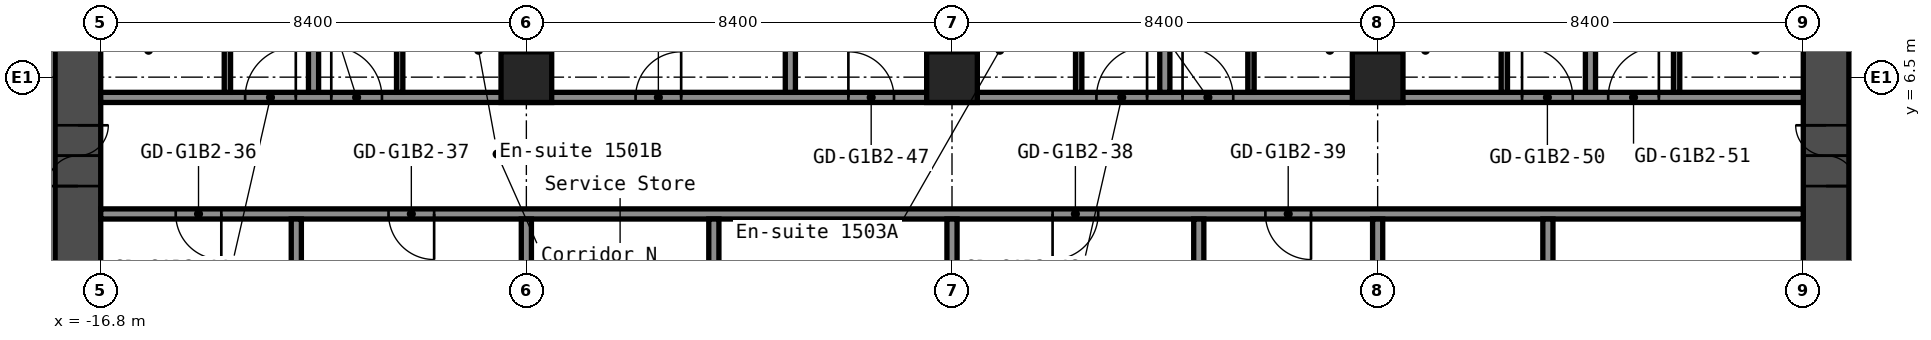
"""IFC4 building model, lengths in metres.
Left out: names, types, materials, properties, quantities, classifications, styles, units other than length and angle.
Written with IfcOpenShell. Run it as: python <this file> out.ifc"""

import sys

from ifc_helpers import new_model, si_unit, direction, frame, frame_2d, origin, origin_2d, place, context, subcontext, project, spatial, rectangle, hollow_rectangle, extrude, element, fill, save


model = new_model("IFC4")
c1 = context("Model", 3, precision=1e-05, world=origin(), true_north=direction((0.0, 1.0)))
c2 = subcontext(c1, "Body", "Model", "MODEL_VIEW")
j1 = project(units=[si_unit("LENGTHUNIT", "METRE"), si_unit("PLANEANGLEUNIT", "RADIAN")], contexts=[c1])
p1 = place(None, origin())
s1 = spatial("IfcSite", under=j1, at=p1, CompositionType="ELEMENT")
p2 = place(p1, origin())
s2 = spatial("IfcBuilding", under=s1, at=p2, CompositionType="ELEMENT")
p3 = place(p2, frame((0.0, 0.0, 55.0)))
s3 = spatial("IfcBuildingStorey", under=s2, at=p3, CompositionType="ELEMENT", Elevation=55.0)
for number, where, z_axis, x_axis in (
    (1, (-8.4, 6.5, 0.0), (0.0, 0.0, 1.0), (1.0, 0.0, 0.0)),
    (2, (0.0, 6.5, 0.0), (0.0, 0.0, 1.0), (1.0, 0.0, 0.0)),
    (3, (8.4, 6.5, 0.0), (0.0, 0.0, 1.0), (1.0, 0.0, 0.0)),
):
    element("IfcColumn", number, at=place(p3, frame(where, z_axis=z_axis, x_axis=x_axis)), inside=s3, PredefinedType="COLUMN", context=c2, shape_type="SweptSolid", body=[
        extrude(hollow_rectangle(XDim=1.0, YDim=1.0, WallThickness=0.04, at=origin_2d()), origin(), (0.0, 0.0, 1.0), 2.8),
    ])
p4 = place(p3, frame((-17.25, -8.4, 0.0), z_axis=(0.0, 0.0, 1.0), x_axis=(0.0, 1.0, 0.0)))
e4 = element("IfcWall", 4, at=p4, inside=s3, PredefinedType="SHEAR", context=c2, shape_type="SweptSolid", body=[
    extrude(rectangle(XDim=16.8, YDim=0.9, at=frame_2d((8.4, 0.0))), origin(), (0.0, 0.0, 1.0), 2.8),
])
p5 = place(p4, frame((12.75, 0.0, 0.0)))
e5 = element("IfcOpeningElement", 5, at=p5, cuts=e4, PredefinedType="OPENING", context=c2, shape_type="SweptSolid", body=[
    extrude(rectangle(XDim=1.2, YDim=2.1, at=frame_2d((0.6, 1.05))), frame((0.0, 0.46, 0.0), z_axis=(0.0, -1.0, 0.0), x_axis=(1.0, 0.0, 0.0)), (0.0, 0.0, 1.0), 0.92),
])
p6 = place(p4, frame((2.85, 0.0, 0.0)))
e6 = element("IfcOpeningElement", 6, at=p6, cuts=e4, PredefinedType="OPENING", context=c2, shape_type="SweptSolid", body=[
    extrude(rectangle(XDim=1.2, YDim=2.1, at=frame_2d((0.6, 1.05))), frame((0.0, 0.46, 0.0), z_axis=(0.0, -1.0, 0.0), x_axis=(1.0, 0.0, 0.0)), (0.0, 0.0, 1.0), 0.92),
])
p7 = place(p3, frame((17.25, -8.4, 0.0), z_axis=(0.0, 0.0, 1.0), x_axis=(0.0, 1.0, 0.0)))
e7 = element("IfcWall", 7, at=p7, inside=s3, PredefinedType="SHEAR", context=c2, shape_type="SweptSolid", body=[
    extrude(rectangle(XDim=16.8, YDim=0.9, at=frame_2d((8.4, 0.0))), origin(), (0.0, 0.0, 1.0), 2.8),
])
p8 = place(p7, frame((12.75, 0.0, 0.0)))
e8 = element("IfcOpeningElement", 8, at=p8, cuts=e7, PredefinedType="OPENING", context=c2, shape_type="SweptSolid", body=[
    extrude(rectangle(XDim=1.2, YDim=2.1, at=frame_2d((0.6, 1.05))), frame((0.0, 0.46, 0.0), z_axis=(0.0, -1.0, 0.0), x_axis=(1.0, 0.0, 0.0)), (0.0, 0.0, 1.0), 0.92),
])
p9 = place(p7, frame((2.85, 0.0, 0.0)))
e9 = element("IfcOpeningElement", 9, at=p9, cuts=e7, PredefinedType="OPENING", context=c2, shape_type="SweptSolid", body=[
    extrude(rectangle(XDim=1.2, YDim=2.1, at=frame_2d((0.6, 1.05))), frame((0.0, 0.46, 0.0), z_axis=(0.0, -1.0, 0.0), x_axis=(1.0, 0.0, 0.0)), (0.0, 0.0, 1.0), 0.92),
])
p10 = place(p3, frame((-16.8, 3.8, 0.0), z_axis=(0.0, 0.0, 1.0), x_axis=(1.0, 0.0, 0.0)))
e10 = element("IfcWall", 10, at=p10, inside=s3, PredefinedType="PARTITIONING", context=c2, shape_type="SweptSolid", body=[
    extrude(rectangle(XDim=33.6, YDim=0.2, at=frame_2d((16.8, 0.0))), origin(), (0.0, 0.0, 1.0), 2.8),
])
p11 = place(p10, frame((1.48, 0.0, 0.0)))
e11 = element("IfcOpeningElement", 11, at=p11, cuts=e10, PredefinedType="OPENING", context=c2, shape_type="SweptSolid", body=[
    extrude(rectangle(XDim=0.9, YDim=2.1, at=frame_2d((0.45, 1.05))), frame((0.0, 0.11, 0.0), z_axis=(0.0, -1.0, 0.0), x_axis=(1.0, 0.0, 0.0)), (0.0, 0.0, 1.0), 0.22),
])
p12 = place(p10, frame((5.68, 0.0, 0.0)))
e12 = element("IfcOpeningElement", 12, at=p12, cuts=e10, PredefinedType="OPENING", context=c2, shape_type="SweptSolid", body=[
    extrude(rectangle(XDim=0.9, YDim=2.1, at=frame_2d((0.45, 1.05))), frame((0.0, 0.11, 0.0), z_axis=(0.0, -1.0, 0.0), x_axis=(1.0, 0.0, 0.0)), (0.0, 0.0, 1.0), 0.22),
])
p13 = place(p10, frame((18.785, 0.0, 0.0)))
e13 = element("IfcOpeningElement", 13, at=p13, cuts=e10, PredefinedType="OPENING", context=c2, shape_type="SweptSolid", body=[
    extrude(rectangle(XDim=0.9, YDim=2.1, at=frame_2d((0.45, 1.05))), frame((0.0, 0.11, 0.0), z_axis=(0.0, -1.0, 0.0), x_axis=(1.0, 0.0, 0.0)), (0.0, 0.0, 1.0), 0.22),
])
p14 = place(p10, frame((22.985, 0.0, 0.0)))
e14 = element("IfcOpeningElement", 14, at=p14, cuts=e10, PredefinedType="OPENING", context=c2, shape_type="SweptSolid", body=[
    extrude(rectangle(XDim=0.9, YDim=2.1, at=frame_2d((0.45, 1.05))), frame((0.0, 0.11, 0.0), z_axis=(0.0, -1.0, 0.0), x_axis=(1.0, 0.0, 0.0)), (0.0, 0.0, 1.0), 0.22),
])
p15 = place(p3, frame((-16.8, 6.1, 0.0), z_axis=(0.0, 0.0, 1.0), x_axis=(1.0, 0.0, 0.0)))
e15 = element("IfcWall", 15, at=p15, inside=s3, PredefinedType="PARTITIONING", context=c2, shape_type="SweptSolid", body=[
    extrude(rectangle(XDim=33.6, YDim=0.2, at=frame_2d((16.8, 0.0))), origin(), (0.0, 0.0, 1.0), 2.8),
])
p16 = place(p15, frame((2.85, 0.0, 0.0)))
e16 = element("IfcOpeningElement", 16, at=p16, cuts=e15, PredefinedType="OPENING", context=c2, shape_type="SweptSolid", body=[
    extrude(rectangle(XDim=1.0, YDim=2.1, at=frame_2d((0.5, 1.05))), frame((0.0, 0.11, 0.0), z_axis=(0.0, -1.0, 0.0), x_axis=(1.0, 0.0, 0.0)), (0.0, 0.0, 1.0), 0.22),
])
p17 = place(p15, frame((4.55, 0.0, 0.0)))
e17 = element("IfcOpeningElement", 17, at=p17, cuts=e15, PredefinedType="OPENING", context=c2, shape_type="SweptSolid", body=[
    extrude(rectangle(XDim=1.0, YDim=2.1, at=frame_2d((0.5, 1.05))), frame((0.0, 0.11, 0.0), z_axis=(0.0, -1.0, 0.0), x_axis=(1.0, 0.0, 0.0)), (0.0, 0.0, 1.0), 0.22),
])
p18 = place(p15, frame((10.555, 0.0, 0.0)))
e18 = element("IfcOpeningElement", 18, at=p18, cuts=e15, PredefinedType="OPENING", context=c2, shape_type="SweptSolid", body=[
    extrude(rectangle(XDim=0.9, YDim=2.1, at=frame_2d((0.45, 1.05))), frame((0.0, 0.11, 0.0), z_axis=(0.0, -1.0, 0.0), x_axis=(1.0, 0.0, 0.0)), (0.0, 0.0, 1.0), 0.22),
])
p19 = place(p15, frame((14.755, 0.0, 0.0)))
e19 = element("IfcOpeningElement", 19, at=p19, cuts=e15, PredefinedType="OPENING", context=c2, shape_type="SweptSolid", body=[
    extrude(rectangle(XDim=0.9, YDim=2.1, at=frame_2d((0.45, 1.05))), frame((0.0, 0.11, 0.0), z_axis=(0.0, -1.0, 0.0), x_axis=(1.0, 0.0, 0.0)), (0.0, 0.0, 1.0), 0.22),
])
p20 = place(p15, frame((19.65, 0.0, 0.0)))
e20 = element("IfcOpeningElement", 20, at=p20, cuts=e15, PredefinedType="OPENING", context=c2, shape_type="SweptSolid", body=[
    extrude(rectangle(XDim=1.0, YDim=2.1, at=frame_2d((0.5, 1.05))), frame((0.0, 0.11, 0.0), z_axis=(0.0, -1.0, 0.0), x_axis=(1.0, 0.0, 0.0)), (0.0, 0.0, 1.0), 0.22),
])
p21 = place(p15, frame((21.35, 0.0, 0.0)))
e21 = element("IfcOpeningElement", 21, at=p21, cuts=e15, PredefinedType="OPENING", context=c2, shape_type="SweptSolid", body=[
    extrude(rectangle(XDim=1.0, YDim=2.1, at=frame_2d((0.5, 1.05))), frame((0.0, 0.11, 0.0), z_axis=(0.0, -1.0, 0.0), x_axis=(1.0, 0.0, 0.0)), (0.0, 0.0, 1.0), 0.22),
])
p22 = place(p15, frame((28.05, 0.0, 0.0)))
e22 = element("IfcOpeningElement", 22, at=p22, cuts=e15, PredefinedType="OPENING", context=c2, shape_type="SweptSolid", body=[
    extrude(rectangle(XDim=1.0, YDim=2.1, at=frame_2d((0.5, 1.05))), frame((0.0, 0.11, 0.0), z_axis=(0.0, -1.0, 0.0), x_axis=(1.0, 0.0, 0.0)), (0.0, 0.0, 1.0), 0.22),
])
p23 = place(p15, frame((29.75, 0.0, 0.0)))
e23 = element("IfcOpeningElement", 23, at=p23, cuts=e15, PredefinedType="OPENING", context=c2, shape_type="SweptSolid", body=[
    extrude(rectangle(XDim=1.0, YDim=2.1, at=frame_2d((0.5, 1.05))), frame((0.0, 0.11, 0.0), z_axis=(0.0, -1.0, 0.0), x_axis=(1.0, 0.0, 0.0)), (0.0, 0.0, 1.0), 0.22),
])
p24 = place(p3, frame((-14.3, 6.2, 0.0), z_axis=(0.0, 0.0, 1.0), x_axis=(0.0, 1.0, 0.0)))
e24 = element("IfcWall", 24, at=p24, inside=s3, PredefinedType="PARTITIONING", context=c2, shape_type="SweptSolid", body=[
    extrude(rectangle(XDim=2.9, YDim=0.125, at=frame_2d((1.45, 0.0))), origin(), (0.0, 0.0, 1.0), 2.8),
])
p25 = place(p24, frame((1.5, 0.0, 0.0)))
e25 = element("IfcOpeningElement", 25, at=p25, cuts=e24, PredefinedType="OPENING", context=c2, shape_type="SweptSolid", body=[
    extrude(rectangle(XDim=0.8, YDim=2.1, at=frame_2d((0.4, 1.05))), frame((0.0, 0.073, 0.0), z_axis=(0.0, -1.0, 0.0), x_axis=(1.0, 0.0, 0.0)), (0.0, 0.0, 1.0), 0.145),
])
p26 = place(p3, frame((-12.94, -3.7, 0.0), z_axis=(0.0, 0.0, 1.0), x_axis=(0.0, 1.0, 0.0)))
e26 = element("IfcWall", 26, at=p26, inside=s3, PredefinedType="PARTITIONING", context=c2, shape_type="SweptSolid", body=[
    extrude(rectangle(XDim=7.4, YDim=0.2, at=frame_2d((3.7, 0.0))), origin(), (0.0, 0.0, 1.0), 2.8),
])
p27 = place(p3, frame((-12.6, 6.2, 0.0), z_axis=(0.0, 0.0, 1.0), x_axis=(0.0, 1.0, 0.0)))
e27 = element("IfcWall", 27, at=p27, inside=s3, PredefinedType="PARTITIONING", context=c2, shape_type="SweptSolid", body=[
    extrude(rectangle(XDim=14.1, YDim=0.2, at=frame_2d((7.05, 0.0))), origin(), (0.0, 0.0, 1.0), 2.8),
])
p28 = place(p3, frame((-10.9, 6.2, 0.0), z_axis=(0.0, 0.0, 1.0), x_axis=(0.0, 1.0, 0.0)))
e28 = element("IfcWall", 28, at=p28, inside=s3, PredefinedType="PARTITIONING", context=c2, shape_type="SweptSolid", body=[
    extrude(rectangle(XDim=2.9, YDim=0.125, at=frame_2d((1.45, 0.0))), origin(), (0.0, 0.0, 1.0), 2.8),
])
p29 = place(p28, frame((1.5, 0.0, 0.0)))
e29 = element("IfcOpeningElement", 29, at=p29, cuts=e28, PredefinedType="OPENING", context=c2, shape_type="SweptSolid", body=[
    extrude(rectangle(XDim=0.8, YDim=2.1, at=frame_2d((0.4, 1.05))), frame((0.0, 0.073, 0.0), z_axis=(0.0, -1.0, 0.0), x_axis=(1.0, 0.0, 0.0)), (0.0, 0.0, 1.0), 0.145),
])
p30 = place(p3, frame((-8.4, -3.7, 0.0), z_axis=(0.0, 0.0, 1.0), x_axis=(0.0, 1.0, 0.0)))
e30 = element("IfcWall", 30, at=p30, inside=s3, PredefinedType="PARTITIONING", context=c2, shape_type="SweptSolid", body=[
    extrude(rectangle(XDim=7.4, YDim=0.2, at=frame_2d((3.7, 0.0))), origin(), (0.0, 0.0, 1.0), 2.8),
])
p31 = place(p3, frame((-8.4, 6.99, 0.0), z_axis=(0.0, 0.0, 1.0), x_axis=(0.0, 1.0, 0.0)))
e31 = element("IfcWall", 31, at=p31, inside=s3, PredefinedType="PARTITIONING", context=c2, shape_type="SweptSolid", body=[
    extrude(rectangle(XDim=13.31, YDim=0.2, at=frame_2d((6.655, 0.0))), origin(), (0.0, 0.0, 1.0), 2.8),
])
p32 = place(p3, frame((-4.7, -3.7, 0.0), z_axis=(0.0, 0.0, 1.0), x_axis=(0.0, 1.0, 0.0)))
e32 = element("IfcWall", 32, at=p32, inside=s3, PredefinedType="PARTITIONING", context=c2, shape_type="SweptSolid", body=[
    extrude(rectangle(XDim=7.4, YDim=0.2, at=frame_2d((3.7, 0.0))), origin(), (0.0, 0.0, 1.0), 2.8),
])
p33 = place(p3, frame((-3.19, 6.2, 0.0), z_axis=(0.0, 0.0, 1.0), x_axis=(0.0, 1.0, 0.0)))
e33 = element("IfcWall", 33, at=p33, inside=s3, PredefinedType="PARTITIONING", context=c2, shape_type="SweptSolid", body=[
    extrude(rectangle(XDim=14.1, YDim=0.2, at=frame_2d((7.05, 0.0))), origin(), (0.0, 0.0, 1.0), 2.8),
])
p34 = place(p3, frame((0.0, -3.7, 0.0), z_axis=(0.0, 0.0, 1.0), x_axis=(0.0, 1.0, 0.0)))
e34 = element("IfcWall", 34, at=p34, inside=s3, PredefinedType="PARTITIONING", context=c2, shape_type="SweptSolid", body=[
    extrude(rectangle(XDim=7.4, YDim=0.2, at=frame_2d((3.7, 0.0))), origin(), (0.0, 0.0, 1.0), 2.8),
])
p35 = place(p3, frame((0.0, 6.99, 0.0), z_axis=(0.0, 0.0, 1.0), x_axis=(0.0, 1.0, 0.0)))
e35 = element("IfcWall", 35, at=p35, inside=s3, PredefinedType="PARTITIONING", context=c2, shape_type="SweptSolid", body=[
    extrude(rectangle(XDim=13.31, YDim=0.2, at=frame_2d((6.655, 0.0))), origin(), (0.0, 0.0, 1.0), 2.8),
])
p36 = place(p3, frame((2.5, 6.2, 0.0), z_axis=(0.0, 0.0, 1.0), x_axis=(0.0, 1.0, 0.0)))
e36 = element("IfcWall", 36, at=p36, inside=s3, PredefinedType="PARTITIONING", context=c2, shape_type="SweptSolid", body=[
    extrude(rectangle(XDim=2.9, YDim=0.125, at=frame_2d((1.45, 0.0))), origin(), (0.0, 0.0, 1.0), 2.8),
])
p37 = place(p36, frame((1.5, 0.0, 0.0)))
e37 = element("IfcOpeningElement", 37, at=p37, cuts=e36, PredefinedType="OPENING", context=c2, shape_type="SweptSolid", body=[
    extrude(rectangle(XDim=0.8, YDim=2.1, at=frame_2d((0.4, 1.05))), frame((0.0, 0.073, 0.0), z_axis=(0.0, -1.0, 0.0), x_axis=(1.0, 0.0, 0.0)), (0.0, 0.0, 1.0), 0.145),
])
p38 = place(p3, frame((4.2, 6.2, 0.0), z_axis=(0.0, 0.0, 1.0), x_axis=(0.0, 1.0, 0.0)))
e38 = element("IfcWall", 38, at=p38, inside=s3, PredefinedType="PARTITIONING", context=c2, shape_type="SweptSolid", body=[
    extrude(rectangle(XDim=14.1, YDim=0.2, at=frame_2d((7.05, 0.0))), origin(), (0.0, 0.0, 1.0), 2.8),
])
p39 = place(p3, frame((4.87, -3.7, 0.0), z_axis=(0.0, 0.0, 1.0), x_axis=(0.0, 1.0, 0.0)))
e39 = element("IfcWall", 39, at=p39, inside=s3, PredefinedType="PARTITIONING", context=c2, shape_type="SweptSolid", body=[
    extrude(rectangle(XDim=7.4, YDim=0.2, at=frame_2d((3.7, 0.0))), origin(), (0.0, 0.0, 1.0), 2.8),
])
p40 = place(p3, frame((5.9, 6.2, 0.0), z_axis=(0.0, 0.0, 1.0), x_axis=(0.0, 1.0, 0.0)))
e40 = element("IfcWall", 40, at=p40, inside=s3, PredefinedType="PARTITIONING", context=c2, shape_type="SweptSolid", body=[
    extrude(rectangle(XDim=2.9, YDim=0.125, at=frame_2d((1.45, 0.0))), origin(), (0.0, 0.0, 1.0), 2.8),
])
p41 = place(p40, frame((1.5, 0.0, 0.0)))
e41 = element("IfcOpeningElement", 41, at=p41, cuts=e40, PredefinedType="OPENING", context=c2, shape_type="SweptSolid", body=[
    extrude(rectangle(XDim=0.8, YDim=2.1, at=frame_2d((0.4, 1.05))), frame((0.0, 0.073, 0.0), z_axis=(0.0, -1.0, 0.0), x_axis=(1.0, 0.0, 0.0)), (0.0, 0.0, 1.0), 0.145),
])
p42 = place(p3, frame((8.4, -3.7, 0.0), z_axis=(0.0, 0.0, 1.0), x_axis=(0.0, 1.0, 0.0)))
e42 = element("IfcWall", 42, at=p42, inside=s3, PredefinedType="PARTITIONING", context=c2, shape_type="SweptSolid", body=[
    extrude(rectangle(XDim=7.4, YDim=0.2, at=frame_2d((3.7, 0.0))), origin(), (0.0, 0.0, 1.0), 2.8),
])
p43 = place(p3, frame((8.4, 6.99, 0.0), z_axis=(0.0, 0.0, 1.0), x_axis=(0.0, 1.0, 0.0)))
e43 = element("IfcWall", 43, at=p43, inside=s3, PredefinedType="PARTITIONING", context=c2, shape_type="SweptSolid", body=[
    extrude(rectangle(XDim=13.31, YDim=0.2, at=frame_2d((6.655, 0.0))), origin(), (0.0, 0.0, 1.0), 2.8),
])
p44 = place(p3, frame((10.9, 6.2, 0.0), z_axis=(0.0, 0.0, 1.0), x_axis=(0.0, 1.0, 0.0)))
e44 = element("IfcWall", 44, at=p44, inside=s3, PredefinedType="PARTITIONING", context=c2, shape_type="SweptSolid", body=[
    extrude(rectangle(XDim=2.9, YDim=0.125, at=frame_2d((1.45, 0.0))), origin(), (0.0, 0.0, 1.0), 2.8),
])
p45 = place(p44, frame((1.5, 0.0, 0.0)))
e45 = element("IfcOpeningElement", 45, at=p45, cuts=e44, PredefinedType="OPENING", context=c2, shape_type="SweptSolid", body=[
    extrude(rectangle(XDim=0.8, YDim=2.1, at=frame_2d((0.4, 1.05))), frame((0.0, 0.073, 0.0), z_axis=(0.0, -1.0, 0.0), x_axis=(1.0, 0.0, 0.0)), (0.0, 0.0, 1.0), 0.145),
])
p46 = place(p3, frame((11.76, -3.7, 0.0), z_axis=(0.0, 0.0, 1.0), x_axis=(0.0, 1.0, 0.0)))
e46 = element("IfcWall", 46, at=p46, inside=s3, PredefinedType="PARTITIONING", context=c2, shape_type="SweptSolid", body=[
    extrude(rectangle(XDim=7.4, YDim=0.2, at=frame_2d((3.7, 0.0))), origin(), (0.0, 0.0, 1.0), 2.8),
])
p47 = place(p3, frame((12.6, 6.2, 0.0), z_axis=(0.0, 0.0, 1.0), x_axis=(0.0, 1.0, 0.0)))
e47 = element("IfcWall", 47, at=p47, inside=s3, PredefinedType="PARTITIONING", context=c2, shape_type="SweptSolid", body=[
    extrude(rectangle(XDim=14.1, YDim=0.2, at=frame_2d((7.05, 0.0))), origin(), (0.0, 0.0, 1.0), 2.8),
])
p48 = place(p3, frame((14.3, 6.2, 0.0), z_axis=(0.0, 0.0, 1.0), x_axis=(0.0, 1.0, 0.0)))
e48 = element("IfcWall", 48, at=p48, inside=s3, PredefinedType="PARTITIONING", context=c2, shape_type="SweptSolid", body=[
    extrude(rectangle(XDim=2.9, YDim=0.125, at=frame_2d((1.45, 0.0))), origin(), (0.0, 0.0, 1.0), 2.8),
])
p49 = place(p48, frame((1.5, 0.0, 0.0)))
e49 = element("IfcOpeningElement", 49, at=p49, cuts=e48, PredefinedType="OPENING", context=c2, shape_type="SweptSolid", body=[
    extrude(rectangle(XDim=0.8, YDim=2.1, at=frame_2d((0.4, 1.05))), frame((0.0, 0.073, 0.0), z_axis=(0.0, -1.0, 0.0), x_axis=(1.0, 0.0, 0.0)), (0.0, 0.0, 1.0), 0.145),
])
p50 = place(p5, origin())
e50 = element("IfcDoor", 50, at=p50, inside=s3, OperationType="DOUBLE_DOOR_SINGLE_SWING", PredefinedType="DOOR", context=c2, shape_type="SweptSolid", body=[
    extrude(rectangle(XDim=1.2, YDim=2.1, at=frame_2d((0.6, 1.05))), frame((0.0, 0.025, 0.0), z_axis=(0.0, -1.0, 0.0), x_axis=(1.0, 0.0, 0.0)), (0.0, 0.0, 1.0), 0.05),
])
fill(e5, e50)
p51 = place(p8, origin())
e51 = element("IfcDoor", 51, at=p51, inside=s3, OperationType="DOUBLE_DOOR_SINGLE_SWING", PredefinedType="DOOR", context=c2, shape_type="SweptSolid", body=[
    extrude(rectangle(XDim=1.2, YDim=2.1, at=frame_2d((0.6, 1.05))), frame((0.0, 0.025, 0.0), z_axis=(0.0, -1.0, 0.0), x_axis=(1.0, 0.0, 0.0)), (0.0, 0.0, 1.0), 0.05),
])
fill(e8, e51)
p52 = place(p11, origin())
e52 = element("IfcDoor", 52, at=p52, inside=s3, OperationType="SINGLE_SWING_RIGHT", PredefinedType="DOOR", context=c2, shape_type="SweptSolid", body=[
    extrude(rectangle(XDim=0.9, YDim=2.1, at=frame_2d((0.45, 1.05))), frame((0.0, 0.025, 0.0), z_axis=(0.0, -1.0, 0.0), x_axis=(1.0, 0.0, 0.0)), (0.0, 0.0, 1.0), 0.05),
])
fill(e11, e52)
p53 = place(p12, origin())
e53 = element("IfcDoor", 53, at=p53, inside=s3, OperationType="SINGLE_SWING_RIGHT", PredefinedType="DOOR", context=c2, shape_type="SweptSolid", body=[
    extrude(rectangle(XDim=0.9, YDim=2.1, at=frame_2d((0.45, 1.05))), frame((0.0, 0.025, 0.0), z_axis=(0.0, -1.0, 0.0), x_axis=(1.0, 0.0, 0.0)), (0.0, 0.0, 1.0), 0.05),
])
fill(e12, e53)
p54 = place(p13, origin())
e54 = element("IfcDoor", 54, at=p54, inside=s3, OperationType="SINGLE_SWING_LEFT", PredefinedType="DOOR", context=c2, shape_type="SweptSolid", body=[
    extrude(rectangle(XDim=0.9, YDim=2.1, at=frame_2d((0.45, 1.05))), frame((0.0, 0.025, 0.0), z_axis=(0.0, -1.0, 0.0), x_axis=(1.0, 0.0, 0.0)), (0.0, 0.0, 1.0), 0.05),
])
fill(e13, e54)
p55 = place(p14, origin())
e55 = element("IfcDoor", 55, at=p55, inside=s3, OperationType="SINGLE_SWING_RIGHT", PredefinedType="DOOR", context=c2, shape_type="SweptSolid", body=[
    extrude(rectangle(XDim=0.9, YDim=2.1, at=frame_2d((0.45, 1.05))), frame((0.0, 0.025, 0.0), z_axis=(0.0, -1.0, 0.0), x_axis=(1.0, 0.0, 0.0)), (0.0, 0.0, 1.0), 0.05),
])
fill(e14, e55)
p56 = place(p16, origin())
e56 = element("IfcDoor", 56, at=p56, inside=s3, OperationType="SINGLE_SWING_LEFT", PredefinedType="DOOR", context=c2, shape_type="SweptSolid", body=[
    extrude(rectangle(XDim=1.0, YDim=2.1, at=frame_2d((0.5, 1.05))), frame((0.0, 0.025, 0.0), z_axis=(0.0, -1.0, 0.0), x_axis=(1.0, 0.0, 0.0)), (0.0, 0.0, 1.0), 0.05),
])
fill(e16, e56)
p57 = place(p17, origin())
e57 = element("IfcDoor", 57, at=p57, inside=s3, OperationType="SINGLE_SWING_RIGHT", PredefinedType="DOOR", context=c2, shape_type="SweptSolid", body=[
    extrude(rectangle(XDim=1.0, YDim=2.1, at=frame_2d((0.5, 1.05))), frame((0.0, 0.025, 0.0), z_axis=(0.0, -1.0, 0.0), x_axis=(1.0, 0.0, 0.0)), (0.0, 0.0, 1.0), 0.05),
])
fill(e17, e57)
p58 = place(p18, origin())
e58 = element("IfcDoor", 58, at=p58, inside=s3, OperationType="SINGLE_SWING_LEFT", PredefinedType="DOOR", context=c2, shape_type="SweptSolid", body=[
    extrude(rectangle(XDim=0.9, YDim=2.1, at=frame_2d((0.45, 1.05))), frame((0.0, 0.025, 0.0), z_axis=(0.0, -1.0, 0.0), x_axis=(1.0, 0.0, 0.0)), (0.0, 0.0, 1.0), 0.05),
])
fill(e18, e58)
p59 = place(p19, origin())
e59 = element("IfcDoor", 59, at=p59, inside=s3, OperationType="SINGLE_SWING_RIGHT", PredefinedType="DOOR", context=c2, shape_type="SweptSolid", body=[
    extrude(rectangle(XDim=0.9, YDim=2.1, at=frame_2d((0.45, 1.05))), frame((0.0, 0.025, 0.0), z_axis=(0.0, -1.0, 0.0), x_axis=(1.0, 0.0, 0.0)), (0.0, 0.0, 1.0), 0.05),
])
fill(e19, e59)
p60 = place(p20, origin())
e60 = element("IfcDoor", 60, at=p60, inside=s3, OperationType="SINGLE_SWING_LEFT", PredefinedType="DOOR", context=c2, shape_type="SweptSolid", body=[
    extrude(rectangle(XDim=1.0, YDim=2.1, at=frame_2d((0.5, 1.05))), frame((0.0, 0.025, 0.0), z_axis=(0.0, -1.0, 0.0), x_axis=(1.0, 0.0, 0.0)), (0.0, 0.0, 1.0), 0.05),
])
fill(e20, e60)
p61 = place(p21, origin())
e61 = element("IfcDoor", 61, at=p61, inside=s3, OperationType="SINGLE_SWING_RIGHT", PredefinedType="DOOR", context=c2, shape_type="SweptSolid", body=[
    extrude(rectangle(XDim=1.0, YDim=2.1, at=frame_2d((0.5, 1.05))), frame((0.0, 0.025, 0.0), z_axis=(0.0, -1.0, 0.0), x_axis=(1.0, 0.0, 0.0)), (0.0, 0.0, 1.0), 0.05),
])
fill(e21, e61)
p62 = place(p22, origin())
e62 = element("IfcDoor", 62, at=p62, inside=s3, OperationType="SINGLE_SWING_RIGHT", PredefinedType="DOOR", context=c2, shape_type="SweptSolid", body=[
    extrude(rectangle(XDim=1.0, YDim=2.1, at=frame_2d((0.5, 1.05))), frame((0.0, 0.025, 0.0), z_axis=(0.0, -1.0, 0.0), x_axis=(1.0, 0.0, 0.0)), (0.0, 0.0, 1.0), 0.05),
])
fill(e22, e62)
p63 = place(p23, origin())
e63 = element("IfcDoor", 63, at=p63, inside=s3, OperationType="SINGLE_SWING_LEFT", PredefinedType="DOOR", context=c2, shape_type="SweptSolid", body=[
    extrude(rectangle(XDim=1.0, YDim=2.1, at=frame_2d((0.5, 1.05))), frame((0.0, 0.025, 0.0), z_axis=(0.0, -1.0, 0.0), x_axis=(1.0, 0.0, 0.0)), (0.0, 0.0, 1.0), 0.05),
])
fill(e23, e63)
save(model, sys.argv[1])
